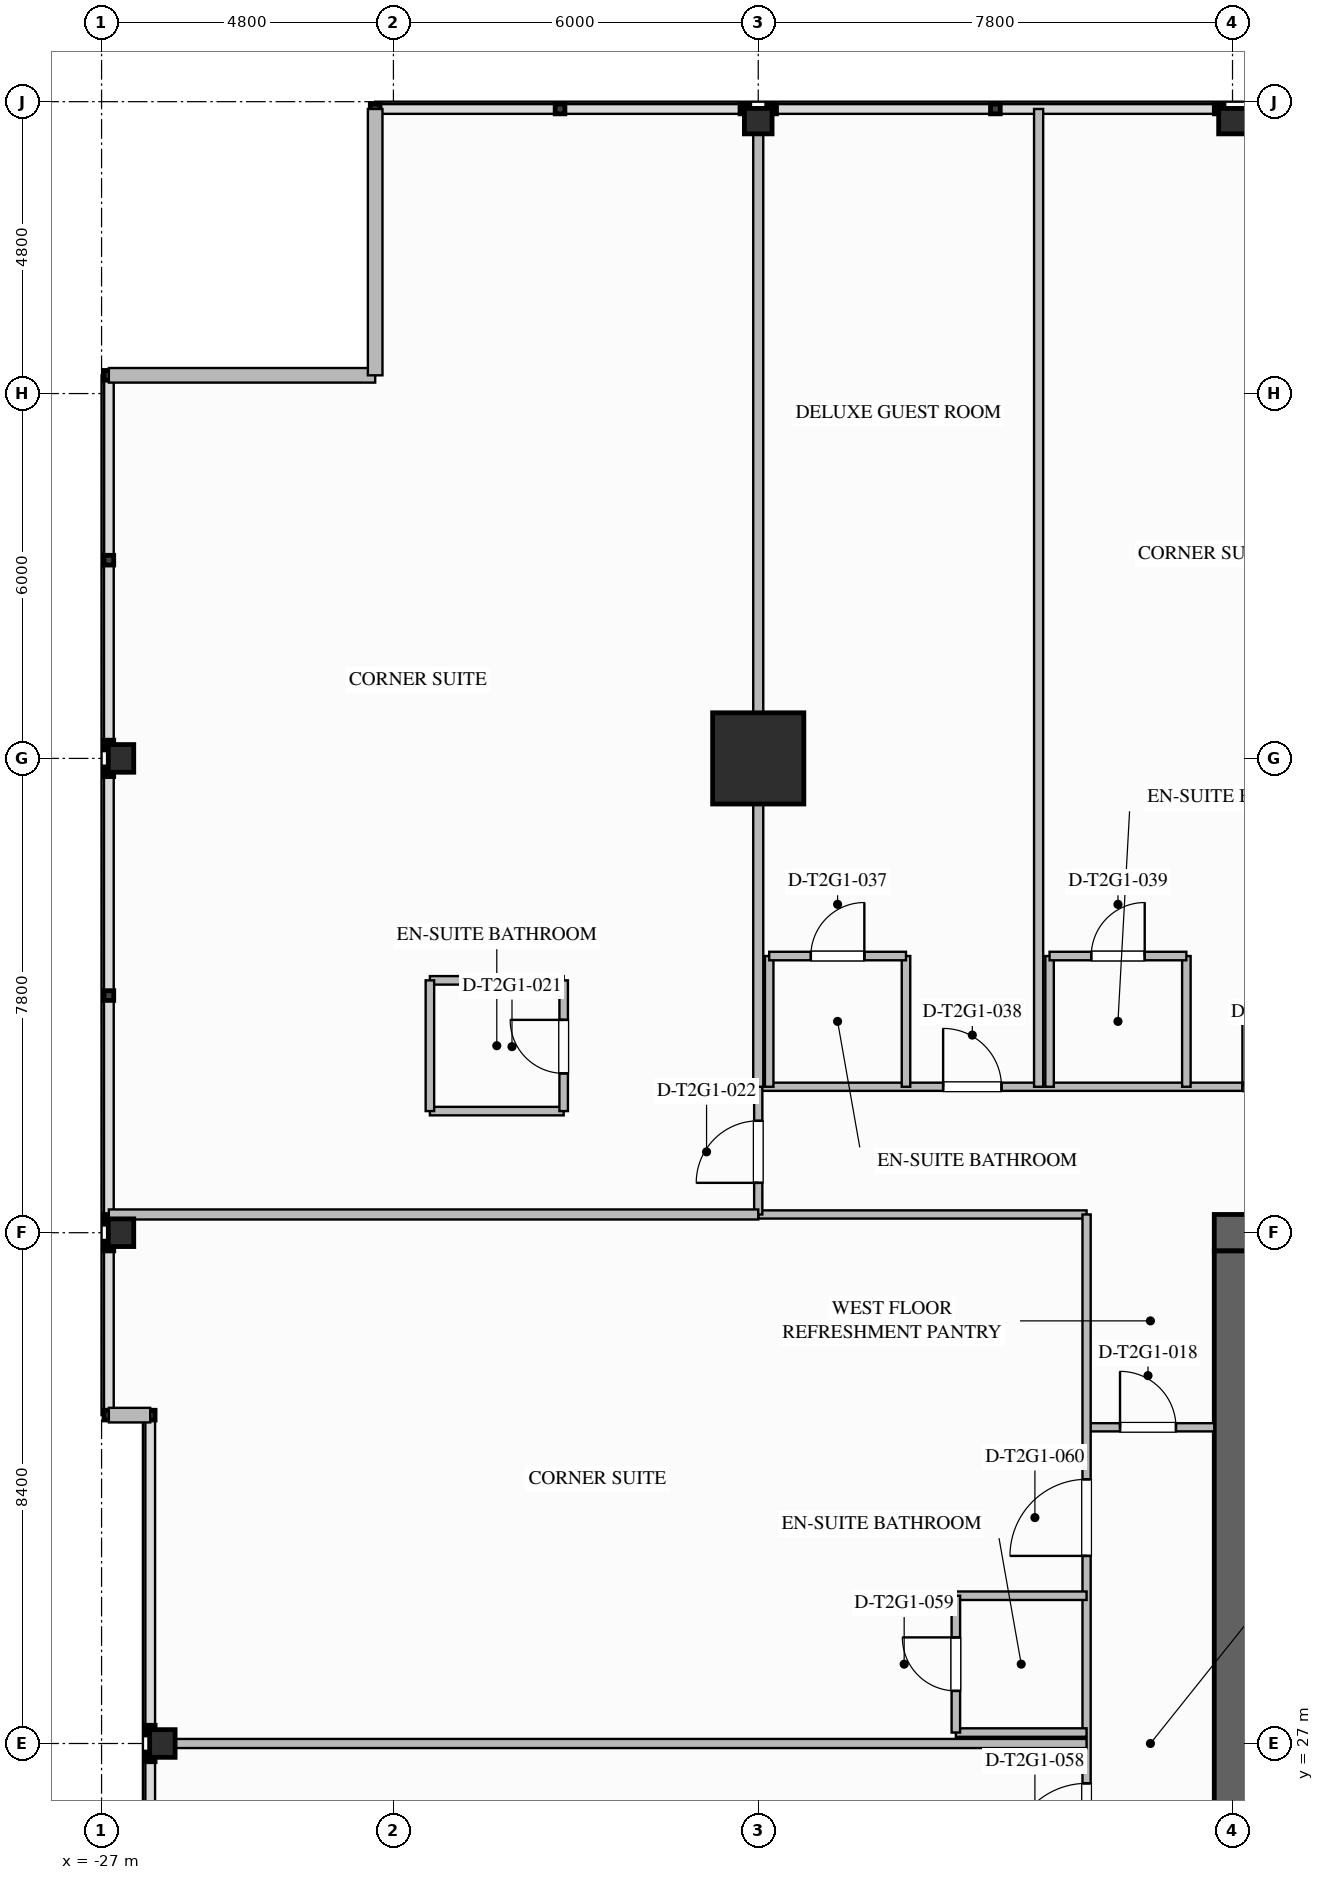
"""IFC4 building model, lengths in metres.
Left out: names, types, materials, properties, quantities, classifications, styles, units other than length and angle.
Written with IfcOpenShell. Run it as: python <this file> out.ifc"""

import sys

from ifc_helpers import new_model, si_unit, direction, frame, frame_2d, origin, origin_2d, place, context, subcontext, project, spatial, rectangle, i_section, extrude, element, fill, save


model = new_model("IFC4")
c1 = context("Model", 3, precision=1e-05, world=origin(), true_north=direction((0.0, 1.0)))
c2 = subcontext(c1, "Body", "Model", "MODEL_VIEW")
j1 = project(units=[si_unit("LENGTHUNIT", "METRE"), si_unit("PLANEANGLEUNIT", "RADIAN")], contexts=[c1])
p1 = place(None, origin())
s1 = spatial("IfcSite", under=j1, at=p1, CompositionType="ELEMENT")
p2 = place(p1, origin())
s2 = spatial("IfcBuilding", under=s1, at=p2, CompositionType="ELEMENT")
p3 = place(p2, frame((0.0, 0.0, 91.8)))
s3 = spatial("IfcBuildingStorey", under=s2, at=p3, CompositionType="ELEMENT", Elevation=91.8)
p4 = place(p3, frame((-8.7, 35.4, 0.0), z_axis=(0.0, 0.0, 1.0), x_axis=(1.0, 0.0, 0.0)))
e1 = element("IfcWall", 1, at=p4, inside=s3, PredefinedType="SHEAR", context=c2, shape_type="SweptSolid", body=[
    extrude(rectangle(XDim=17.4, YDim=0.6, at=frame_2d((8.7, 0.0))), origin(), (0.0, 0.0, 1.0), 3.5),
])
p5 = place(p3, frame((-8.4, 18.9, 0.0), z_axis=(0.0, 0.0, 1.0), x_axis=(0.0, 1.0, 0.0)))
e2 = element("IfcWall", 2, at=p5, inside=s3, PredefinedType="SHEAR", context=c2, shape_type="SweptSolid", body=[
    extrude(rectangle(XDim=16.2, YDim=0.6, at=frame_2d((8.1, 0.0))), origin(), (0.0, 0.0, 1.0), 3.5),
])
p6 = place(p5, frame((4.5, 0.0, 0.0)))
e3 = element("IfcOpeningElement", 3, at=p6, cuts=e2, PredefinedType="OPENING", context=c2, shape_type="SweptSolid", body=[
    extrude(rectangle(XDim=1.08, YDim=2.04, at=frame_2d((0.54, 1.02))), frame((0.0, 0.31, 0.0), z_axis=(0.0, -1.0, 0.0), x_axis=(1.0, 0.0, 0.0)), (0.0, 0.0, 1.0), 0.62),
])
p7 = place(p3, frame((-16.2, 43.2, 0.0), z_axis=(0.0, 0.0, 1.0), x_axis=(1.0, 0.0, 0.0)))
e4 = element("IfcColumn", 4, at=p7, inside=s3, PredefinedType="COLUMN", context=c2, shape_type="SweptSolid", body=[
    extrude(rectangle(XDim=1.5, YDim=1.5, at=origin_2d()), origin(), (0.0, 0.0, 1.0), 3.5),
])
for number, where, z_axis, x_axis in (
    (5, (-26.0, 27.0, 0.0), (0.0, 0.0, 1.0), (1.0, 0.0, 0.0)),
    (6, (-26.68, 35.4, 0.0), (0.0, 0.0, 1.0), (1.0, 0.0, 0.0)),
    (7, (-26.68, 43.2, 0.0), (0.0, 0.0, 1.0), (1.0, 0.0, 0.0)),
    (8, (-16.2, 53.68, 0.0), (0.0, 0.0, 1.0), (0.0, 1.0, 0.0)),
    (9, (-8.4, 53.68, 0.0), (0.0, 0.0, 1.0), (0.0, 1.0, 0.0)),
):
    element("IfcColumn", number, at=place(p3, frame(where, z_axis=z_axis, x_axis=x_axis)), inside=s3, PredefinedType="COLUMN", context=c2, shape_type="SweptSolid", body=[
        extrude(i_section(OverallWidth=0.418, OverallDepth=0.455, WebThickness=0.042, FlangeThickness=0.068, FilletRadius=0.03, at=origin_2d()), origin(), (0.0, 0.0, 1.0), 3.497),
    ])
for number, where, z_axis, x_axis in (
    (10, (-26.88, 49.5, 0.0), (0.0, 0.0, 1.0), (1.0, 0.0, 0.0)),
    (11, (-22.5, 49.5, 0.0), (0.0, 0.0, 1.0), (0.0, 1.0, 0.0)),
):
    element("IfcWall", number, at=place(p3, frame(where, z_axis=z_axis, x_axis=x_axis)), inside=s3, PredefinedType="STANDARD", context=c2, shape_type="SweptSolid", body=[
        extrude(rectangle(XDim=4.38, YDim=0.24, at=frame_2d((2.19, 0.0))), origin(), (0.0, 0.0, 1.0), 3.24),
    ])
p8 = place(p3, frame((-26.2, 32.4, 0.0), z_axis=(0.0, 0.0, 1.0), x_axis=(-1.0, 0.0, 0.0)))
e12 = element("IfcWall", 12, at=p8, inside=s3, PredefinedType="STANDARD", context=c2, shape_type="SweptSolid", body=[
    extrude(rectangle(XDim=0.68, YDim=0.24, at=frame_2d((0.34, 0.0))), origin(), (0.0, 0.0, 1.0), 3.24),
])
p9 = place(p3, frame((-10.8, 32.2, 0.0), z_axis=(0.0, 0.0, 1.0), x_axis=(1.0, 0.0, 0.0)))
e13 = element("IfcWall", 13, at=p9, inside=s3, PredefinedType="PARTITIONING", context=c2, shape_type="SweptSolid", body=[
    extrude(rectangle(XDim=2.1, YDim=0.135, at=frame_2d((1.05, 0.0))), origin(), (0.0, 0.0, 1.0), 3.24),
])
p10 = place(p9, frame((0.55, 0.0, 0.0)))
e14 = element("IfcOpeningElement", 14, at=p10, cuts=e13, PredefinedType="OPENING", context=c2, shape_type="SweptSolid", body=[
    extrude(rectangle(XDim=0.92, YDim=2.1, at=frame_2d((0.46, 1.05))), frame((0.0, 0.077, 0.0), z_axis=(0.0, -1.0, 0.0), x_axis=(1.0, 0.0, 0.0)), (0.0, 0.0, 1.0), 0.155),
])
p11 = place(p3, frame((-16.2, 35.7, 0.0), z_axis=(0.0, 0.0, 1.0), x_axis=(1.0, 0.0, 0.0)))
e15 = element("IfcWall", 15, at=p11, inside=s3, PredefinedType="PARTITIONING", context=c2, shape_type="SweptSolid", body=[
    extrude(rectangle(XDim=5.4, YDim=0.135, at=frame_2d((2.7, 0.0))), origin(), (0.0, 0.0, 1.0), 3.24),
])
p12 = place(p3, frame((-16.2, 37.8, 0.0), z_axis=(0.0, 0.0, 1.0), x_axis=(1.0, 0.0, 0.0)))
e16 = element("IfcWall", 16, at=p12, inside=s3, PredefinedType="PARTITIONING", context=c2, shape_type="SweptSolid", body=[
    extrude(rectangle(XDim=24.9, YDim=0.135, at=frame_2d((12.45, 0.0))), origin(), (0.0, 0.0, 1.0), 3.24),
])
p13 = place(p12, frame((3.041, 0.0, 0.0)))
e17 = element("IfcOpeningElement", 17, at=p13, cuts=e16, PredefinedType="OPENING", context=c2, shape_type="SweptSolid", body=[
    extrude(rectangle(XDim=0.96, YDim=2.15, at=frame_2d((0.48, 1.075))), frame((0.0, 0.077, 0.0), z_axis=(0.0, -1.0, 0.0), x_axis=(1.0, 0.0, 0.0)), (0.0, 0.0, 1.0), 0.155),
])
p14 = place(p12, frame((7.963, 0.0, 0.0)))
e18 = element("IfcOpeningElement", 18, at=p14, cuts=e16, PredefinedType="OPENING", context=c2, shape_type="SweptSolid", body=[
    extrude(rectangle(XDim=1.26, YDim=2.2, at=frame_2d((0.63, 1.1))), frame((0.0, 0.077, 0.0), z_axis=(0.0, -1.0, 0.0), x_axis=(1.0, 0.0, 0.0)), (0.0, 0.0, 1.0), 0.155),
])
p15 = place(p12, frame((12.171, 0.0, 0.0)))
e19 = element("IfcOpeningElement", 19, at=p15, cuts=e16, PredefinedType="OPENING", context=c2, shape_type="SweptSolid", body=[
    extrude(rectangle(XDim=1.02, YDim=2.15, at=frame_2d((0.51, 1.075))), frame((0.0, 0.077, 0.0), z_axis=(0.0, -1.0, 0.0), x_axis=(1.0, 0.0, 0.0)), (0.0, 0.0, 1.0), 0.155),
])
p16 = place(p12, frame((18.257, 0.0, 0.0)))
e20 = element("IfcOpeningElement", 20, at=p16, cuts=e16, PredefinedType="OPENING", context=c2, shape_type="SweptSolid", body=[
    extrude(rectangle(XDim=0.96, YDim=2.15, at=frame_2d((0.48, 1.075))), frame((0.0, 0.077, 0.0), z_axis=(0.0, -1.0, 0.0), x_axis=(1.0, 0.0, 0.0)), (0.0, 0.0, 1.0), 0.155),
])
p17 = place(p12, frame((23.099, 0.0, 0.0)))
e21 = element("IfcOpeningElement", 21, at=p17, cuts=e16, PredefinedType="OPENING", context=c2, shape_type="SweptSolid", body=[
    extrude(rectangle(XDim=0.96, YDim=2.15, at=frame_2d((0.48, 1.075))), frame((0.0, 0.077, 0.0), z_axis=(0.0, -1.0, 0.0), x_axis=(1.0, 0.0, 0.0)), (0.0, 0.0, 1.0), 0.155),
])
p18 = place(p3, frame((-10.8, 18.3, 0.0), z_axis=(0.0, 0.0, 1.0), x_axis=(0.0, 1.0, 0.0)))
e22 = element("IfcWall", 22, at=p18, inside=s3, PredefinedType="PARTITIONING", context=c2, shape_type="SweptSolid", body=[
    extrude(rectangle(XDim=17.4, YDim=0.135, at=frame_2d((8.7, 0.0))), origin(), (0.0, 0.0, 1.0), 3.24),
])
p19 = place(p18, frame((6.785, 0.0, 0.0)))
e23 = element("IfcOpeningElement", 23, at=p19, cuts=e22, PredefinedType="OPENING", context=c2, shape_type="SweptSolid", body=[
    extrude(rectangle(XDim=1.26, YDim=2.2, at=frame_2d((0.63, 1.1))), frame((0.0, 0.077, 0.0), z_axis=(0.0, -1.0, 0.0), x_axis=(1.0, 0.0, 0.0)), (0.0, 0.0, 1.0), 0.155),
])
p20 = place(p18, frame((11.785, 0.0, 0.0)))
e24 = element("IfcOpeningElement", 24, at=p20, cuts=e22, PredefinedType="OPENING", context=c2, shape_type="SweptSolid", body=[
    extrude(rectangle(XDim=1.26, YDim=2.2, at=frame_2d((0.63, 1.1))), frame((0.0, 0.077, 0.0), z_axis=(0.0, -1.0, 0.0), x_axis=(1.0, 0.0, 0.0)), (0.0, 0.0, 1.0), 0.155),
])
p21 = place(p3, frame((-16.2, 35.7, 0.0), z_axis=(0.0, 0.0, 1.0), x_axis=(0.0, 1.0, 0.0)))
e25 = element("IfcWall", 25, at=p21, inside=s3, PredefinedType="PARTITIONING", context=c2, shape_type="SweptSolid", body=[
    extrude(rectangle(XDim=2.1, YDim=0.135, at=frame_2d((1.05, 0.0))), origin(), (0.0, 0.0, 1.0), 2.452),
])
p22 = place(p21, frame((0.52, 0.0, 0.0)))
e26 = element("IfcOpeningElement", 26, at=p22, cuts=e25, PredefinedType="OPENING", context=c2, shape_type="SweptSolid", body=[
    extrude(rectangle(XDim=1.02, YDim=2.15, at=frame_2d((0.51, 1.075))), frame((0.0, 0.077, 0.0), z_axis=(0.0, -1.0, 0.0), x_axis=(1.0, 0.0, 0.0)), (0.0, 0.0, 1.0), 0.155),
])
p23 = place(p3, frame((-16.2, 37.8, 0.0), z_axis=(0.0, 0.0, 1.0), x_axis=(0.0, 1.0, 0.0)))
e27 = element("IfcWall", 27, at=p23, inside=s3, PredefinedType="PARTITIONING", context=c2, shape_type="SweptSolid", body=[
    extrude(rectangle(XDim=16.08, YDim=0.165, at=frame_2d((8.04, 0.0))), origin(), (0.0, 0.0, 1.0), 2.452),
])
p24 = place(p3, frame((-26.88, 35.7, 0.0), z_axis=(0.0, 0.0, 1.0), x_axis=(1.0, 0.0, 0.0)))
e28 = element("IfcWall", 28, at=p24, inside=s3, PredefinedType="PARTITIONING", context=c2, shape_type="SweptSolid", body=[
    extrude(rectangle(XDim=10.68, YDim=0.165, at=frame_2d((5.34, 0.0))), origin(), (0.0, 0.0, 1.0), 2.452),
])
for number, where, z_axis, x_axis in (
    (29, (-21.6, 37.4, 0.0), (0.0, 0.0, 1.0), (1.0, 0.0, 0.0)),
    (30, (-21.6, 39.55, 0.0), (0.0, 0.0, 1.0), (1.0, 0.0, 0.0)),
):
    element("IfcWall", number, at=place(p3, frame(where, z_axis=z_axis, x_axis=x_axis)), inside=s3, PredefinedType="PLUMBINGWALL", context=c2, shape_type="SweptSolid", body=[
        extrude(rectangle(XDim=2.2, YDim=0.14, at=frame_2d((1.1, 0.0))), origin(), (0.0, 0.0, 1.0), 3.24),
    ])
p25 = place(p3, frame((-21.6, 37.4, 0.0), z_axis=(0.0, 0.0, 1.0), x_axis=(0.0, 1.0, 0.0)))
e31 = element("IfcWall", 31, at=p25, inside=s3, PredefinedType="PLUMBINGWALL", context=c2, shape_type="SweptSolid", body=[
    extrude(rectangle(XDim=2.15, YDim=0.14, at=frame_2d((1.075, 0.0))), origin(), (0.0, 0.0, 1.0), 3.24),
])
p26 = place(p3, frame((-19.4, 37.4, 0.0), z_axis=(0.0, 0.0, 1.0), x_axis=(0.0, 1.0, 0.0)))
e32 = element("IfcWall", 32, at=p26, inside=s3, PredefinedType="PLUMBINGWALL", context=c2, shape_type="SweptSolid", body=[
    extrude(rectangle(XDim=2.15, YDim=0.14, at=frame_2d((1.075, 0.0))), origin(), (0.0, 0.0, 1.0), 3.24),
])
p27 = place(p26, frame((0.62, 0.0, 0.0)))
e33 = element("IfcOpeningElement", 33, at=p27, cuts=e32, PredefinedType="OPENING", context=c2, shape_type="SweptSolid", body=[
    extrude(rectangle(XDim=0.88, YDim=2.1, at=frame_2d((0.44, 1.05))), frame((0.0, 0.08, 0.0), z_axis=(0.0, -1.0, 0.0), x_axis=(1.0, 0.0, 0.0)), (0.0, 0.0, 1.0), 0.16),
])
p28 = place(p3, frame((-16.02, 37.8, 0.0), z_axis=(0.0, 0.0, 1.0), x_axis=(0.0, 1.0, 0.0)))
e34 = element("IfcWall", 34, at=p28, inside=s3, PredefinedType="PLUMBINGWALL", context=c2, shape_type="SweptSolid", body=[
    extrude(rectangle(XDim=2.15, YDim=0.14, at=frame_2d((1.075, 0.0))), origin(), (0.0, 0.0, 1.0), 2.452),
])
p29 = place(p3, frame((-13.77, 37.8, 0.0), z_axis=(0.0, 0.0, 1.0), x_axis=(0.0, 1.0, 0.0)))
e35 = element("IfcWall", 35, at=p29, inside=s3, PredefinedType="PLUMBINGWALL", context=c2, shape_type="SweptSolid", body=[
    extrude(rectangle(XDim=2.15, YDim=0.14, at=frame_2d((1.075, 0.0))), origin(), (0.0, 0.0, 1.0), 3.24),
])
p30 = place(p3, frame((-16.02, 39.95, 0.0), z_axis=(0.0, 0.0, 1.0), x_axis=(1.0, 0.0, 0.0)))
e36 = element("IfcWall", 36, at=p30, inside=s3, PredefinedType="PLUMBINGWALL", context=c2, shape_type="SweptSolid", body=[
    extrude(rectangle(XDim=2.25, YDim=0.14, at=frame_2d((1.125, 0.0))), origin(), (0.0, 0.0, 1.0), 3.24),
])
p31 = place(p30, frame((0.685, 0.0, 0.0)))
e37 = element("IfcOpeningElement", 37, at=p31, cuts=e36, PredefinedType="OPENING", context=c2, shape_type="SweptSolid", body=[
    extrude(rectangle(XDim=0.88, YDim=2.1, at=frame_2d((0.44, 1.05))), frame((0.0, 0.08, 0.0), z_axis=(0.0, -1.0, 0.0), x_axis=(1.0, 0.0, 0.0)), (0.0, 0.0, 1.0), 0.16),
])
p32 = place(p3, frame((-11.589, 37.8, 0.0), z_axis=(0.0, 0.0, 1.0), x_axis=(0.0, 1.0, 0.0)))
e38 = element("IfcWall", 38, at=p32, inside=s3, PredefinedType="PARTITIONING", context=c2, shape_type="SweptSolid", body=[
    extrude(rectangle(XDim=16.08, YDim=0.15, at=frame_2d((8.04, 0.0))), origin(), (0.0, 0.0, 1.0), 3.24),
])
for number, where, z_axis, x_axis in (
    (39, (-11.409, 37.8, 0.0), (0.0, 0.0, 1.0), (0.0, 1.0, 0.0)),
    (40, (-9.159, 37.8, 0.0), (0.0, 0.0, 1.0), (0.0, 1.0, 0.0)),
):
    element("IfcWall", number, at=place(p3, frame(where, z_axis=z_axis, x_axis=x_axis)), inside=s3, PredefinedType="PLUMBINGWALL", context=c2, shape_type="SweptSolid", body=[
        extrude(rectangle(XDim=2.15, YDim=0.14, at=frame_2d((1.075, 0.0))), origin(), (0.0, 0.0, 1.0), 3.24),
    ])
p33 = place(p3, frame((-11.409, 39.95, 0.0), z_axis=(0.0, 0.0, 1.0), x_axis=(1.0, 0.0, 0.0)))
e41 = element("IfcWall", 41, at=p33, inside=s3, PredefinedType="PLUMBINGWALL", context=c2, shape_type="SweptSolid", body=[
    extrude(rectangle(XDim=2.25, YDim=0.14, at=frame_2d((1.125, 0.0))), origin(), (0.0, 0.0, 1.0), 3.24),
])
p34 = place(p33, frame((0.685, 0.0, 0.0)))
e42 = element("IfcOpeningElement", 42, at=p34, cuts=e41, PredefinedType="OPENING", context=c2, shape_type="SweptSolid", body=[
    extrude(rectangle(XDim=0.88, YDim=2.1, at=frame_2d((0.44, 1.05))), frame((0.0, 0.08, 0.0), z_axis=(0.0, -1.0, 0.0), x_axis=(1.0, 0.0, 0.0)), (0.0, 0.0, 1.0), 0.16),
])
p35 = place(p3, frame((-26.2, 27.0, 0.0), z_axis=(0.0, 0.0, 1.0), x_axis=(1.0, 0.0, 0.0)))
e43 = element("IfcWall", 43, at=p35, inside=s3, PredefinedType="PARTITIONING", context=c2, shape_type="SweptSolid", body=[
    extrude(rectangle(XDim=15.4, YDim=0.15, at=frame_2d((7.7, 0.0))), origin(), (0.0, 0.0, 1.0), 2.452),
])
p36 = place(p3, frame((-10.8, 27.18, 0.0), z_axis=(0.0, 0.0, 1.0), x_axis=(-1.0, 0.0, 0.0)))
e44 = element("IfcWall", 44, at=p36, inside=s3, PredefinedType="PLUMBINGWALL", context=c2, shape_type="SweptSolid", body=[
    extrude(rectangle(XDim=2.15, YDim=0.14, at=frame_2d((1.075, 0.0))), origin(), (0.0, 0.0, 1.0), 2.617),
])
p37 = place(p3, frame((-10.8, 29.43, 0.0), z_axis=(0.0, 0.0, 1.0), x_axis=(-1.0, 0.0, 0.0)))
e45 = element("IfcWall", 45, at=p37, inside=s3, PredefinedType="PLUMBINGWALL", context=c2, shape_type="SweptSolid", body=[
    extrude(rectangle(XDim=2.15, YDim=0.14, at=frame_2d((1.075, 0.0))), origin(), (0.0, 0.0, 1.0), 3.24),
])
p38 = place(p3, frame((-12.95, 27.18, 0.0), z_axis=(0.0, 0.0, 1.0), x_axis=(0.0, 1.0, 0.0)))
e46 = element("IfcWall", 46, at=p38, inside=s3, PredefinedType="PLUMBINGWALL", context=c2, shape_type="SweptSolid", body=[
    extrude(rectangle(XDim=2.25, YDim=0.14, at=frame_2d((1.125, 0.0))), origin(), (0.0, 0.0, 1.0), 3.24),
])
p39 = place(p38, frame((0.685, 0.0, 0.0)))
e47 = element("IfcOpeningElement", 47, at=p39, cuts=e46, PredefinedType="OPENING", context=c2, shape_type="SweptSolid", body=[
    extrude(rectangle(XDim=0.88, YDim=2.1, at=frame_2d((0.44, 1.05))), frame((0.0, 0.08, 0.0), z_axis=(0.0, -1.0, 0.0), x_axis=(1.0, 0.0, 0.0)), (0.0, 0.0, 1.0), 0.16),
])
p40 = place(p10, origin())
e48 = element("IfcDoor", 48, at=p40, inside=s3, OperationType="SINGLE_SWING_LEFT", PredefinedType="DOOR", context=c2, shape_type="SweptSolid", body=[
    extrude(rectangle(XDim=0.92, YDim=2.1, at=frame_2d((0.46, 1.05))), frame((0.0, 0.025, 0.0), z_axis=(0.0, -1.0, 0.0), x_axis=(1.0, 0.0, 0.0)), (0.0, 0.0, 1.0), 0.05),
])
fill(e14, e48)
p41 = place(p27, origin())
e49 = element("IfcDoor", 49, at=p41, inside=s3, OperationType="SINGLE_SWING_RIGHT", PredefinedType="DOOR", context=c2, shape_type="SweptSolid", body=[
    extrude(rectangle(XDim=0.88, YDim=2.1, at=frame_2d((0.44, 1.05))), frame((0.0, 0.025, 0.0), z_axis=(0.0, -1.0, 0.0), x_axis=(1.0, 0.0, 0.0)), (0.0, 0.0, 1.0), 0.05),
])
fill(e33, e49)
p42 = place(p22, origin())
e50 = element("IfcDoor", 50, at=p42, inside=s3, OperationType="SINGLE_SWING_LEFT", PredefinedType="DOOR", context=c2, shape_type="SweptSolid", body=[
    extrude(rectangle(XDim=1.02, YDim=2.15, at=frame_2d((0.51, 1.075))), frame((0.0, 0.025, 0.0), z_axis=(0.0, -1.0, 0.0), x_axis=(1.0, 0.0, 0.0)), (0.0, 0.0, 1.0), 0.05),
])
fill(e26, e50)
p43 = place(p31, origin())
e51 = element("IfcDoor", 51, at=p43, inside=s3, OperationType="SINGLE_SWING_RIGHT", PredefinedType="DOOR", context=c2, shape_type="SweptSolid", body=[
    extrude(rectangle(XDim=0.88, YDim=2.1, at=frame_2d((0.44, 1.05))), frame((0.0, 0.025, 0.0), z_axis=(0.0, -1.0, 0.0), x_axis=(1.0, 0.0, 0.0)), (0.0, 0.0, 1.0), 0.05),
])
fill(e37, e51)
p44 = place(p13, origin())
e52 = element("IfcDoor", 52, at=p44, inside=s3, OperationType="SINGLE_SWING_LEFT", PredefinedType="DOOR", context=c2, shape_type="SweptSolid", body=[
    extrude(rectangle(XDim=0.96, YDim=2.15, at=frame_2d((0.48, 1.075))), frame((0.0, 0.025, 0.0), z_axis=(0.0, -1.0, 0.0), x_axis=(1.0, 0.0, 0.0)), (0.0, 0.0, 1.0), 0.05),
])
fill(e17, e52)
p45 = place(p34, origin())
e53 = element("IfcDoor", 53, at=p45, inside=s3, OperationType="SINGLE_SWING_RIGHT", PredefinedType="DOOR", context=c2, shape_type="SweptSolid", body=[
    extrude(rectangle(XDim=0.88, YDim=2.1, at=frame_2d((0.44, 1.05))), frame((0.0, 0.025, 0.0), z_axis=(0.0, -1.0, 0.0), x_axis=(1.0, 0.0, 0.0)), (0.0, 0.0, 1.0), 0.05),
])
fill(e42, e53)
p46 = place(p14, origin())
e54 = element("IfcDoor", 54, at=p46, inside=s3, OperationType="SINGLE_SWING_LEFT", PredefinedType="DOOR", context=c2, shape_type="SweptSolid", body=[
    extrude(rectangle(XDim=1.26, YDim=2.2, at=frame_2d((0.63, 1.1))), frame((0.0, 0.025, 0.0), z_axis=(0.0, -1.0, 0.0), x_axis=(1.0, 0.0, 0.0)), (0.0, 0.0, 1.0), 0.05),
])
fill(e18, e54)
p47 = place(p19, origin())
e55 = element("IfcDoor", 55, at=p47, inside=s3, OperationType="SINGLE_SWING_LEFT", PredefinedType="DOOR", context=c2, shape_type="SweptSolid", body=[
    extrude(rectangle(XDim=1.26, YDim=2.2, at=frame_2d((0.63, 1.1))), frame((0.0, 0.025, 0.0), z_axis=(0.0, -1.0, 0.0), x_axis=(1.0, 0.0, 0.0)), (0.0, 0.0, 1.0), 0.05),
])
fill(e23, e55)
p48 = place(p39, origin())
e56 = element("IfcDoor", 56, at=p48, inside=s3, OperationType="SINGLE_SWING_RIGHT", PredefinedType="DOOR", context=c2, shape_type="SweptSolid", body=[
    extrude(rectangle(XDim=0.88, YDim=2.1, at=frame_2d((0.44, 1.05))), frame((0.0, 0.025, 0.0), z_axis=(0.0, -1.0, 0.0), x_axis=(1.0, 0.0, 0.0)), (0.0, 0.0, 1.0), 0.05),
])
fill(e47, e56)
p49 = place(p20, origin())
e57 = element("IfcDoor", 57, at=p49, inside=s3, OperationType="SINGLE_SWING_LEFT", PredefinedType="DOOR", context=c2, shape_type="SweptSolid", body=[
    extrude(rectangle(XDim=1.26, YDim=2.2, at=frame_2d((0.63, 1.1))), frame((0.0, 0.025, 0.0), z_axis=(0.0, -1.0, 0.0), x_axis=(1.0, 0.0, 0.0)), (0.0, 0.0, 1.0), 0.05),
])
fill(e24, e57)
save(model, sys.argv[1])
